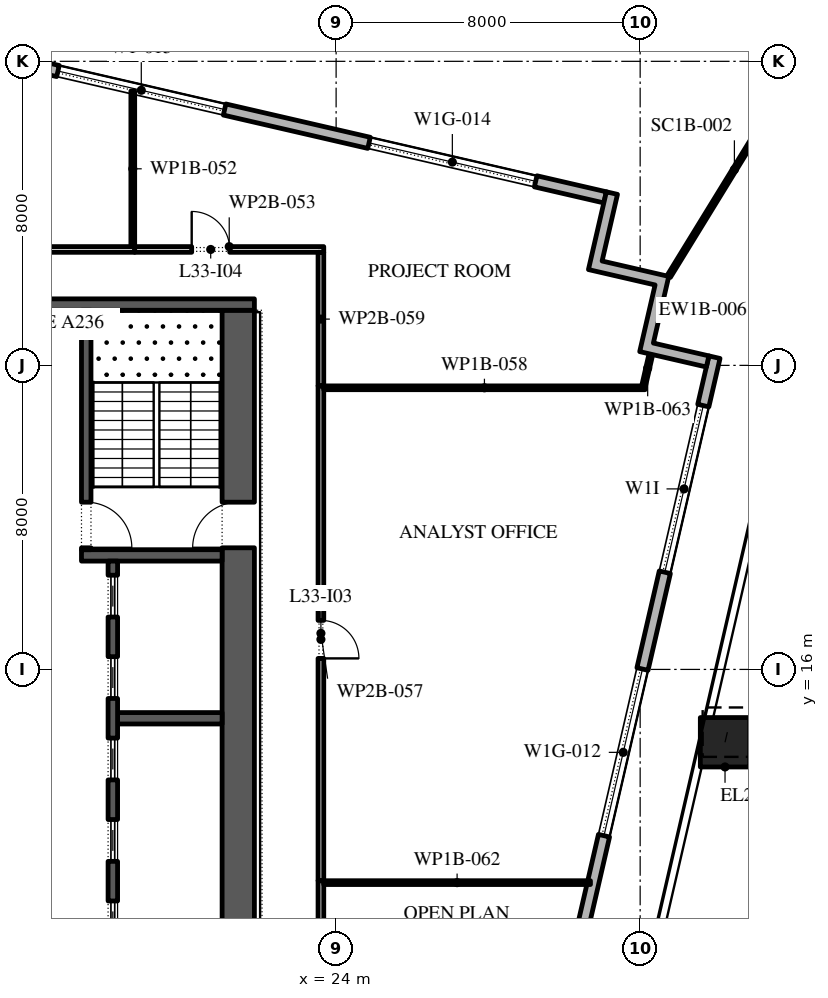
"""IFC4 building model, lengths in metres.
Left out: names, types, materials, properties, quantities, classifications, styles, units other than length and angle.
Written with IfcOpenShell. Run it as: python <this file> out.ifc"""

import sys

from ifc_helpers import new_model, si_unit, direction, frame, frame_2d, origin, origin_2d, place, context, subcontext, project, spatial, polyline, rectangle, outline, extrude, element, fill, save


model = new_model("IFC4")
c1 = context("Model", 3, precision=1e-05, world=origin(), true_north=direction((0.0, 1.0)))
c2 = subcontext(c1, "Body", "Model", "MODEL_VIEW")
j1 = project(units=[si_unit("LENGTHUNIT", "METRE"), si_unit("PLANEANGLEUNIT", "RADIAN")], contexts=[c1])
p1 = place(None, origin())
s1 = spatial("IfcSite", under=j1, at=p1, CompositionType="ELEMENT")
p2 = place(p1, origin())
s2 = spatial("IfcBuilding", under=s1, at=p2, CompositionType="ELEMENT")
p3 = place(p2, frame((0.0, 0.0, 151.8)))
s3 = spatial("IfcBuildingStorey", under=s2, at=p3, CompositionType="ELEMENT", Elevation=151.8)
p4 = place(p3, frame((34.233, 14.083, 0.0), z_axis=(0.014617836866, 0.063111930596, 0.997899395261), x_axis=(-0.974209784844, 0.225644178107, 0.0)))
e1 = element("IfcColumn", 1, at=p4, inside=s3, PredefinedType="COLUMN", context=c2, shape_type="SweptSolid", body=[
    extrude(rectangle(XDim=1.3, YDim=1.3, at=origin_2d()), origin(), (0.0, 0.0, 1.0), 4.209),
])
p5 = place(p3, frame((22.82, -24.016, 0.0), z_axis=(0.0, 0.0, 1.0), x_axis=(0.224953880882, 0.974369412223, 0.0)))
e2 = element("IfcWall", 2, at=p5, inside=s3, PredefinedType="STANDARD", context=c2, shape_type="SweptSolid", body=[
    extrude(rectangle(XDim=49.5, YDim=0.3, at=frame_2d((24.75, 0.0))), origin(), (0.0, 0.0, 1.0), 3.95),
])
p6 = place(p5, frame((1.157, 0.0, 0.45)))
e3 = element("IfcOpeningElement", 3, at=p6, cuts=e2, PredefinedType="OPENING", context=c2, shape_type="SweptSolid", body=[
    extrude(rectangle(XDim=4.5, YDim=3.05, at=frame_2d((2.25, 1.525))), frame((0.0, 0.16, 0.0), z_axis=(0.0, -1.0, 0.0), x_axis=(1.0, 0.0, 0.0)), (0.0, 0.0, 1.0), 0.32),
])
p7 = place(p5, frame((8.121, 0.0, 0.45)))
e4 = element("IfcOpeningElement", 4, at=p7, cuts=e2, PredefinedType="OPENING", context=c2, shape_type="SweptSolid", body=[
    extrude(rectangle(XDim=4.5, YDim=3.05, at=frame_2d((2.25, 1.525))), frame((0.0, 0.16, 0.0), z_axis=(0.0, -1.0, 0.0), x_axis=(1.0, 0.0, 0.0)), (0.0, 0.0, 1.0), 0.32),
])
p8 = place(p5, frame((15.236, 0.0, 0.45)))
e5 = element("IfcOpeningElement", 5, at=p8, cuts=e2, PredefinedType="OPENING", context=c2, shape_type="SweptSolid", body=[
    extrude(rectangle(XDim=4.5, YDim=3.05, at=frame_2d((2.25, 1.525))), frame((0.0, 0.16, 0.0), z_axis=(0.0, -1.0, 0.0), x_axis=(1.0, 0.0, 0.0)), (0.0, 0.0, 1.0), 0.32),
])
p9 = place(p5, frame((23.4, 0.0, 0.0)))
e6 = element("IfcOpeningElement", 6, at=p9, cuts=e2, PredefinedType="OPENING", context=c2, shape_type="SweptSolid", body=[
    extrude(rectangle(XDim=2.4, YDim=3.5, at=frame_2d((1.2, 1.75))), frame((0.0, 0.16, 0.0), z_axis=(0.0, -1.0, 0.0), x_axis=(1.0, 0.0, 0.0)), (0.0, 0.0, 1.0), 0.32),
])
p10 = place(p5, frame((29.464, 0.0, 0.45)))
e7 = element("IfcOpeningElement", 7, at=p10, cuts=e2, PredefinedType="OPENING", context=c2, shape_type="SweptSolid", body=[
    extrude(rectangle(XDim=4.5, YDim=2.825, at=frame_2d((2.25, 1.413))), frame((0.0, 0.16, 0.0), z_axis=(0.0, -1.0, 0.0), x_axis=(1.0, 0.0, 0.0)), (0.0, 0.0, 1.0), 0.32),
])
p11 = place(p5, frame((36.579, 0.0, 0.45)))
e8 = element("IfcOpeningElement", 8, at=p11, cuts=e2, PredefinedType="OPENING", context=c2, shape_type="SweptSolid", body=[
    extrude(rectangle(XDim=4.5, YDim=2.775, at=frame_2d((2.25, 1.387))), frame((0.0, 0.16, 0.0), z_axis=(0.0, -1.0, 0.0), x_axis=(1.0, 0.0, 0.0)), (0.0, 0.0, 1.0), 0.32),
])
p12 = place(p5, frame((43.693, 0.0, 0.45)))
e9 = element("IfcOpeningElement", 9, at=p12, cuts=e2, PredefinedType="OPENING", context=c2, shape_type="SweptSolid", body=[
    extrude(rectangle(XDim=4.5, YDim=2.7, at=frame_2d((2.25, 1.35))), frame((0.0, 0.16, 0.0), z_axis=(0.0, -1.0, 0.0), x_axis=(1.0, 0.0, 0.0)), (0.0, 0.0, 1.0), 0.32),
])
p13 = place(p3, frame((31.078, 28.421, 0.0), z_axis=(0.0, 0.0, 1.0), x_axis=(-0.974370456532, 0.224949357493, 0.0)))
e10 = element("IfcWall", 10, at=p13, inside=s3, PredefinedType="STANDARD", context=c2, shape_type="SweptSolid", body=[
    extrude(rectangle(XDim=51.0, YDim=0.3, at=frame_2d((25.5, 0.0))), origin(), (0.0, 0.0, 1.0), 3.95),
])
p14 = place(p13, frame((1.875, 0.0, 0.45)))
e11 = element("IfcOpeningElement", 11, at=p14, cuts=e10, PredefinedType="OPENING", context=c2, shape_type="SweptSolid", body=[
    extrude(rectangle(XDim=4.5, YDim=2.775, at=frame_2d((2.25, 1.387))), frame((0.0, 0.16, 0.0), z_axis=(0.0, -1.0, 0.0), x_axis=(1.0, 0.0, 0.0)), (0.0, 0.0, 1.0), 0.32),
])
p15 = place(p13, frame((10.275, 0.0, 0.45)))
e12 = element("IfcOpeningElement", 12, at=p15, cuts=e10, PredefinedType="OPENING", context=c2, shape_type="SweptSolid", body=[
    extrude(rectangle(XDim=4.5, YDim=3.05, at=frame_2d((2.25, 1.525))), frame((0.0, 0.16, 0.0), z_axis=(0.0, -1.0, 0.0), x_axis=(1.0, 0.0, 0.0)), (0.0, 0.0, 1.0), 0.32),
])
p16 = place(p13, frame((18.825, 0.0, 0.45)))
e13 = element("IfcOpeningElement", 13, at=p16, cuts=e10, PredefinedType="OPENING", context=c2, shape_type="SweptSolid", body=[
    extrude(rectangle(XDim=4.5, YDim=2.625, at=frame_2d((2.25, 1.312))), frame((0.0, 0.16, 0.0), z_axis=(0.0, -1.0, 0.0), x_axis=(1.0, 0.0, 0.0)), (0.0, 0.0, 1.0), 0.32),
])
p17 = place(p13, frame((28.425, 0.0, 0.0)))
e14 = element("IfcOpeningElement", 14, at=p17, cuts=e10, PredefinedType="OPENING", context=c2, shape_type="SweptSolid", body=[
    extrude(rectangle(XDim=2.4, YDim=3.5, at=frame_2d((1.2, 1.75))), frame((0.0, 0.16, 0.0), z_axis=(0.0, -1.0, 0.0), x_axis=(1.0, 0.0, 0.0)), (0.0, 0.0, 1.0), 0.32),
])
p18 = place(p13, frame((35.925, 0.0, 0.45)))
e15 = element("IfcOpeningElement", 15, at=p18, cuts=e10, PredefinedType="OPENING", context=c2, shape_type="SweptSolid", body=[
    extrude(rectangle(XDim=4.5, YDim=2.475, at=frame_2d((2.25, 1.238))), frame((0.0, 0.16, 0.0), z_axis=(0.0, -1.0, 0.0), x_axis=(1.0, 0.0, 0.0)), (0.0, 0.0, 1.0), 0.32),
])
p19 = place(p13, frame((44.475, 0.0, 0.45)))
e16 = element("IfcOpeningElement", 16, at=p19, cuts=e10, PredefinedType="OPENING", context=c2, shape_type="SweptSolid", body=[
    extrude(rectangle(XDim=4.5, YDim=2.4, at=frame_2d((2.25, 1.2))), frame((0.0, 0.16, 0.0), z_axis=(0.0, -1.0, 0.0), x_axis=(1.0, 0.0, 0.0)), (0.0, 0.0, 1.0), 0.32),
])
p20 = place(p3, origin())
e17 = element("IfcWall", 17, at=p20, inside=s3, PredefinedType="STANDARD", context=c2, shape_type="SweptSolid", body=[
    extrude(outline(polyline([(32.393, 26.116), (30.639, 26.521), (31.111, 28.567), (31.404, 28.5), (30.999, 26.746), (32.753, 26.341), (32.348, 24.587), (33.809, 24.25), (33.742, 23.957), (31.988, 24.362), (32.393, 26.116)])), origin(), (0.0, 0.0, 1.0), 3.95),
])
p21 = place(p3, frame((32.753, 26.341, -0.05), z_axis=(0.0, 0.0, 1.0), x_axis=(0.523477971455, 0.85203920884, 0.0)))
e18 = element("IfcWall", 18, at=p21, inside=s3, PredefinedType="STANDARD", context=c2, shape_type="SweptSolid", body=[
    extrude(rectangle(XDim=6.598, YDim=0.1, at=frame_2d((3.299, 0.0))), origin(), (0.0, 0.0, 1.0), 4.0),
])
p22 = place(p3, frame((21.425, -2.45, 0.0), z_axis=(0.0, 0.0, 1.0), x_axis=(0.0, 1.0, 0.0)))
e19 = element("IfcWall", 19, at=p22, inside=s3, PredefinedType="SHEAR", context=c2, shape_type="SweptSolid", body=[
    extrude(rectangle(XDim=27.9, YDim=0.85, at=frame_2d((13.95, 0.0))), origin(), (0.0, 0.0, 1.0), 3.95),
])
p23 = place(p22, frame((5.05, 0.0, 0.0)))
e20 = element("IfcOpeningElement", 20, at=p23, cuts=e19, PredefinedType="OPENING", context=c2, shape_type="SweptSolid", body=[
    extrude(rectangle(XDim=1.2, YDim=2.1, at=frame_2d((0.6, 1.05))), frame((0.0, 0.435, 0.0), z_axis=(0.0, -1.0, 0.0), x_axis=(1.0, 0.0, 0.0)), (0.0, 0.0, 1.0), 0.87),
])
p24 = place(p22, frame((21.65, 0.0, 0.0)))
e21 = element("IfcOpeningElement", 21, at=p24, cuts=e19, PredefinedType="OPENING", context=c2, shape_type="SweptSolid", body=[
    extrude(rectangle(XDim=1.2, YDim=2.1, at=frame_2d((0.6, 1.05))), frame((0.0, 0.435, 0.0), z_axis=(0.0, -1.0, 0.0), x_axis=(1.0, 0.0, 0.0)), (0.0, 0.0, 1.0), 0.87),
])
p25 = place(p3, frame((10.15, 25.6, 0.0), z_axis=(0.0, 0.0, 1.0), x_axis=(1.0, 0.0, 0.0)))
e22 = element("IfcWall", 22, at=p25, inside=s3, PredefinedType="SHEAR", context=c2, shape_type="SweptSolid", body=[
    extrude(rectangle(XDim=11.7, YDim=0.3, at=frame_2d((5.85, 0.0))), origin(), (0.0, 0.0, 1.0), 3.95),
])
p26 = place(p3, frame((17.3, 19.0, 0.0), z_axis=(0.0, 0.0, 1.0), x_axis=(1.0, 0.0, 0.0)))
e23 = element("IfcWall", 23, at=p26, inside=s3, PredefinedType="SHEAR", context=c2, shape_type="SweptSolid", body=[
    extrude(rectangle(XDim=3.7, YDim=0.3, at=frame_2d((1.85, 0.0))), origin(), (0.0, 0.0, 1.0), 3.95),
])
p27 = place(p3, frame((17.425, 19.15, 0.0), z_axis=(0.0, 0.0, 1.0), x_axis=(0.0, 1.0, 0.0)))
e24 = element("IfcWall", 24, at=p27, inside=s3, PredefinedType="SHEAR", context=c2, shape_type="SweptSolid", body=[
    extrude(rectangle(XDim=6.3, YDim=0.25, at=frame_2d((3.15, 0.0))), origin(), (0.0, 0.0, 1.0), 3.95),
])
p28 = place(p27, frame((0.05, 0.0, 0.0)))
e25 = element("IfcOpeningElement", 25, at=p28, cuts=e24, PredefinedType="OPENING", context=c2, shape_type="SweptSolid", body=[
    extrude(rectangle(XDim=1.2, YDim=2.1, at=frame_2d((0.6, 1.05))), frame((0.0, 0.135, 0.0), z_axis=(0.0, -1.0, 0.0), x_axis=(1.0, 0.0, 0.0)), (0.0, 0.0, 1.0), 0.27),
])
p29 = place(p3, frame((18.25, 14.714, 0.0), z_axis=(0.0, 0.0, 1.0), x_axis=(1.0, 0.0, 0.0)))
e26 = element("IfcWall", 26, at=p29, inside=s3, PredefinedType="SHEAR", context=c2, shape_type="SweptSolid", body=[
    extrude(rectangle(XDim=2.75, YDim=0.3, at=frame_2d((1.375, 0.0))), origin(), (0.0, 0.0, 1.0), 3.95),
])
p30 = place(p3, frame((18.125, 4.15, 0.0), z_axis=(0.0, 0.0, 1.0), x_axis=(0.0, 1.0, 0.0)))
e27 = element("IfcWall", 27, at=p30, inside=s3, PredefinedType="SHEAR", context=c2, shape_type="SweptSolid", body=[
    extrude(rectangle(XDim=14.7, YDim=0.25, at=frame_2d((7.35, 0.0))), origin(), (0.0, 0.0, 1.0), 3.95),
])
p31 = place(p30, frame((0.371, 0.0, 0.0)))
e28 = element("IfcOpeningElement", 28, at=p31, cuts=e27, PredefinedType="OPENING", context=c2, shape_type="SweptSolid", body=[
    extrude(rectangle(XDim=1.1, YDim=2.1, at=frame_2d((0.55, 1.05))), frame((0.0, 0.135, 0.0), z_axis=(0.0, -1.0, 0.0), x_axis=(1.0, 0.0, 0.0)), (0.0, 0.0, 1.0), 0.27),
])
p32 = place(p30, frame((2.514, 0.0, 0.0)))
e29 = element("IfcOpeningElement", 29, at=p32, cuts=e27, PredefinedType="OPENING", context=c2, shape_type="SweptSolid", body=[
    extrude(rectangle(XDim=1.1, YDim=2.1, at=frame_2d((0.55, 1.05))), frame((0.0, 0.135, 0.0), z_axis=(0.0, -1.0, 0.0), x_axis=(1.0, 0.0, 0.0)), (0.0, 0.0, 1.0), 0.27),
])
p33 = place(p30, frame((4.657, 0.0, 0.0)))
e30 = element("IfcOpeningElement", 30, at=p33, cuts=e27, PredefinedType="OPENING", context=c2, shape_type="SweptSolid", body=[
    extrude(rectangle(XDim=1.1, YDim=2.1, at=frame_2d((0.55, 1.05))), frame((0.0, 0.135, 0.0), z_axis=(0.0, -1.0, 0.0), x_axis=(1.0, 0.0, 0.0)), (0.0, 0.0, 1.0), 0.27),
])
p34 = place(p30, frame((6.8, 0.0, 0.0)))
e31 = element("IfcOpeningElement", 31, at=p34, cuts=e27, PredefinedType="OPENING", context=c2, shape_type="SweptSolid", body=[
    extrude(rectangle(XDim=1.1, YDim=2.1, at=frame_2d((0.55, 1.05))), frame((0.0, 0.135, 0.0), z_axis=(0.0, -1.0, 0.0), x_axis=(1.0, 0.0, 0.0)), (0.0, 0.0, 1.0), 0.27),
])
p35 = place(p30, frame((8.943, 0.0, 0.0)))
e32 = element("IfcOpeningElement", 32, at=p35, cuts=e27, PredefinedType="OPENING", context=c2, shape_type="SweptSolid", body=[
    extrude(rectangle(XDim=1.1, YDim=2.1, at=frame_2d((0.55, 1.05))), frame((0.0, 0.135, 0.0), z_axis=(0.0, -1.0, 0.0), x_axis=(1.0, 0.0, 0.0)), (0.0, 0.0, 1.0), 0.27),
])
p36 = place(p30, frame((11.086, 0.0, 0.0)))
e33 = element("IfcOpeningElement", 33, at=p36, cuts=e27, PredefinedType="OPENING", context=c2, shape_type="SweptSolid", body=[
    extrude(rectangle(XDim=1.1, YDim=2.1, at=frame_2d((0.55, 1.05))), frame((0.0, 0.135, 0.0), z_axis=(0.0, -1.0, 0.0), x_axis=(1.0, 0.0, 0.0)), (0.0, 0.0, 1.0), 0.27),
])
p37 = place(p30, frame((13.229, 0.0, 0.0)))
e34 = element("IfcOpeningElement", 34, at=p37, cuts=e27, PredefinedType="OPENING", context=c2, shape_type="SweptSolid", body=[
    extrude(rectangle(XDim=1.1, YDim=2.1, at=frame_2d((0.55, 1.05))), frame((0.0, 0.135, 0.0), z_axis=(0.0, -1.0, 0.0), x_axis=(1.0, 0.0, 0.0)), (0.0, 0.0, 1.0), 0.27),
])
p38 = place(p3, frame((8.4, 27.05, 0.0), z_axis=(0.0, 0.0, 1.0), x_axis=(1.0, 0.0, 0.0)))
e35 = element("IfcWall", 35, at=p38, inside=s3, PredefinedType="PARTITIONING", context=c2, shape_type="SweptSolid", body=[
    extrude(rectangle(XDim=10.3, YDim=0.15, at=frame_2d((5.15, 0.0))), origin(), (0.0, 0.0, 1.0), 3.95),
])
p39 = place(p38, frame((6.6, 0.0, 0.0)))
e36 = element("IfcOpeningElement", 36, at=p39, cuts=e35, PredefinedType="OPENING", context=c2, shape_type="SweptSolid", body=[
    extrude(rectangle(XDim=1.0, YDim=2.1, at=frame_2d((0.5, 1.05))), frame((0.0, 0.085, 0.0), z_axis=(0.0, -1.0, 0.0), x_axis=(1.0, 0.0, 0.0)), (0.0, 0.0, 1.0), 0.17),
])
p40 = place(p3, frame((18.65, 27.125, 0.0), z_axis=(0.0, 0.0, 1.0), x_axis=(0.0, 1.0, 0.0)))
e37 = element("IfcWall", 37, at=p40, inside=s3, PredefinedType="PARTITIONING", context=c2, shape_type="SweptSolid", body=[
    extrude(rectangle(XDim=4.094, YDim=0.1, at=frame_2d((2.047, 0.0))), origin(), (0.0, 0.0, 1.0), 3.95),
])
p41 = place(p3, frame((18.7, 27.05, 0.0), z_axis=(0.0, 0.0, 1.0), x_axis=(1.0, 0.0, 0.0)))
e38 = element("IfcWall", 38, at=p41, inside=s3, PredefinedType="PARTITIONING", context=c2, shape_type="SweptSolid", body=[
    extrude(rectangle(XDim=4.975, YDim=0.15, at=frame_2d((2.488, 0.0))), origin(), (0.0, 0.0, 1.0), 3.95),
])
p42 = place(p41, frame((1.5, 0.0, 0.0)))
e39 = element("IfcOpeningElement", 39, at=p42, cuts=e38, PredefinedType="OPENING", context=c2, shape_type="SweptSolid", body=[
    extrude(rectangle(XDim=1.0, YDim=2.1, at=frame_2d((0.5, 1.05))), frame((0.0, 0.085, 0.0), z_axis=(0.0, -1.0, 0.0), x_axis=(1.0, 0.0, 0.0)), (0.0, 0.0, 1.0), 0.17),
])
p43 = place(p3, frame((23.6, 10.44, 0.0), z_axis=(0.0, 0.0, 1.0), x_axis=(0.0, -1.0, 0.0)))
e40 = element("IfcWall", 40, at=p43, inside=s3, PredefinedType="PARTITIONING", context=c2, shape_type="SweptSolid", body=[
    extrude(rectangle(XDim=14.81, YDim=0.15, at=frame_2d((7.405, 0.0))), origin(), (0.0, 0.0, 1.0), 3.95),
])
p44 = place(p43, frame((6.86, 0.0, 0.0)))
e41 = element("IfcOpeningElement", 41, at=p44, cuts=e40, PredefinedType="OPENING", context=c2, shape_type="SweptSolid", body=[
    extrude(rectangle(XDim=1.0, YDim=2.1, at=frame_2d((0.5, 1.05))), frame((0.0, 0.085, 0.0), z_axis=(0.0, -1.0, 0.0), x_axis=(1.0, 0.0, 0.0)), (0.0, 0.0, 1.0), 0.17),
])
p45 = place(p3, frame((23.6, 23.46, 0.0), z_axis=(0.0, 0.0, 1.0), x_axis=(0.0, -1.0, 0.0)))
e42 = element("IfcWall", 42, at=p45, inside=s3, PredefinedType="PARTITIONING", context=c2, shape_type="SweptSolid", body=[
    extrude(rectangle(XDim=13.02, YDim=0.15, at=frame_2d((6.51, 0.0))), origin(), (0.0, 0.0, 1.0), 3.95),
])
p46 = place(p45, frame((6.17, 0.0, 0.0)))
e43 = element("IfcOpeningElement", 43, at=p46, cuts=e42, PredefinedType="OPENING", context=c2, shape_type="SweptSolid", body=[
    extrude(rectangle(XDim=1.0, YDim=2.1, at=frame_2d((0.5, 1.05))), frame((0.0, 0.085, 0.0), z_axis=(0.0, -1.0, 0.0), x_axis=(1.0, 0.0, 0.0)), (0.0, 0.0, 1.0), 0.17),
])
p47 = place(p3, frame((23.675, 23.41, 0.0), z_axis=(0.0, 0.0, 1.0), x_axis=(1.0, 0.0, 0.0)))
e44 = element("IfcWall", 44, at=p47, inside=s3, PredefinedType="PARTITIONING", context=c2, shape_type="SweptSolid", body=[
    extrude(rectangle(XDim=8.455, YDim=0.1, at=frame_2d((4.228, 0.0))), origin(), (0.0, 0.0, 1.0), 3.95),
])
p48 = place(p3, frame((23.6, 26.975, 0.0), z_axis=(0.0, 0.0, 1.0), x_axis=(0.0, -1.0, 0.0)))
e45 = element("IfcWall", 45, at=p48, inside=s3, PredefinedType="PARTITIONING", context=c2, shape_type="SweptSolid", body=[
    extrude(rectangle(XDim=3.515, YDim=0.15, at=frame_2d((1.758, 0.0))), origin(), (0.0, 0.0, 1.0), 3.95),
])
p49 = place(p3, frame((30.692, 10.39, 0.0), z_axis=(0.0, 0.0, 1.0), x_axis=(-1.0, 0.0, 0.0)))
e46 = element("IfcWall", 46, at=p49, inside=s3, PredefinedType="PARTITIONING", context=c2, shape_type="SweptSolid", body=[
    extrude(rectangle(XDim=7.017, YDim=0.1, at=frame_2d((3.508, 0.0))), origin(), (0.0, 0.0, 1.0), 3.95),
])
p50 = place(p3, frame((32.091, 23.459, 0.0), z_axis=(0.0, 0.0, 1.0), x_axis=(0.223406444343, 0.97472537703, 0.0)))
e47 = element("IfcWall", 47, at=p50, inside=s3, PredefinedType="PARTITIONING", context=c2, shape_type="SweptSolid", body=[
    extrude(rectangle(XDim=0.957, YDim=0.1, at=frame_2d((0.479, 0.0))), origin(), (0.0, 0.0, 1.0), 3.95),
])
p51 = place(p11, origin())
e48 = element("IfcWindow", 48, at=p51, inside=s3, PartitioningType="DOUBLE_PANEL_VERTICAL", PredefinedType="WINDOW", context=c2, shape_type="SweptSolid", body=[
    extrude(rectangle(XDim=4.5, YDim=2.775, at=frame_2d((2.25, 1.387))), frame((0.0, 0.03, 0.0), z_axis=(0.0, -1.0, 0.0), x_axis=(1.0, 0.0, 0.0)), (0.0, 0.0, 1.0), 0.06),
])
fill(e8, e48)
p52 = place(p12, origin())
e49 = element("IfcWindow", 49, at=p52, inside=s3, PartitioningType="DOUBLE_PANEL_VERTICAL", PredefinedType="WINDOW", context=c2, shape_type="SweptSolid", body=[
    extrude(rectangle(XDim=4.5, YDim=2.7, at=frame_2d((2.25, 1.35))), frame((0.0, 0.03, 0.0), z_axis=(0.0, -1.0, 0.0), x_axis=(1.0, 0.0, 0.0)), (0.0, 0.0, 1.0), 0.06),
])
fill(e9, e49)
p53 = place(p14, origin())
e50 = element("IfcWindow", 50, at=p53, inside=s3, PartitioningType="DOUBLE_PANEL_VERTICAL", PredefinedType="WINDOW", context=c2, shape_type="SweptSolid", body=[
    extrude(rectangle(XDim=4.5, YDim=2.775, at=frame_2d((2.25, 1.387))), frame((0.0, 0.03, 0.0), z_axis=(0.0, -1.0, 0.0), x_axis=(1.0, 0.0, 0.0)), (0.0, 0.0, 1.0), 0.06),
])
fill(e11, e50)
p54 = place(p15, origin())
e51 = element("IfcWindow", 51, at=p54, inside=s3, PartitioningType="DOUBLE_PANEL_VERTICAL", PredefinedType="WINDOW", context=c2, shape_type="SweptSolid", body=[
    extrude(rectangle(XDim=4.5, YDim=3.05, at=frame_2d((2.25, 1.525))), frame((0.0, 0.03, 0.0), z_axis=(0.0, -1.0, 0.0), x_axis=(1.0, 0.0, 0.0)), (0.0, 0.0, 1.0), 0.06),
])
fill(e12, e51)
p55 = place(p33, origin())
e52 = element("IfcDoor", 52, at=p55, inside=s3, OperationType="SLIDING_TO_LEFT", PredefinedType="DOOR", context=c2, shape_type="SweptSolid", body=[
    extrude(rectangle(XDim=1.1, YDim=2.1, at=frame_2d((0.55, 1.05))), frame((0.0, 0.025, 0.0), z_axis=(0.0, -1.0, 0.0), x_axis=(1.0, 0.0, 0.0)), (0.0, 0.0, 1.0), 0.05),
])
fill(e30, e52)
p56 = place(p34, origin())
e53 = element("IfcDoor", 53, at=p56, inside=s3, OperationType="SLIDING_TO_LEFT", PredefinedType="DOOR", context=c2, shape_type="SweptSolid", body=[
    extrude(rectangle(XDim=1.1, YDim=2.1, at=frame_2d((0.55, 1.05))), frame((0.0, 0.025, 0.0), z_axis=(0.0, -1.0, 0.0), x_axis=(1.0, 0.0, 0.0)), (0.0, 0.0, 1.0), 0.05),
])
fill(e31, e53)
p57 = place(p35, origin())
e54 = element("IfcDoor", 54, at=p57, inside=s3, OperationType="SLIDING_TO_LEFT", PredefinedType="DOOR", context=c2, shape_type="SweptSolid", body=[
    extrude(rectangle(XDim=1.1, YDim=2.1, at=frame_2d((0.55, 1.05))), frame((0.0, 0.025, 0.0), z_axis=(0.0, -1.0, 0.0), x_axis=(1.0, 0.0, 0.0)), (0.0, 0.0, 1.0), 0.05),
])
fill(e32, e54)
p58 = place(p36, origin())
e55 = element("IfcDoor", 55, at=p58, inside=s3, OperationType="SLIDING_TO_LEFT", PredefinedType="DOOR", context=c2, shape_type="SweptSolid", body=[
    extrude(rectangle(XDim=1.1, YDim=2.1, at=frame_2d((0.55, 1.05))), frame((0.0, 0.025, 0.0), z_axis=(0.0, -1.0, 0.0), x_axis=(1.0, 0.0, 0.0)), (0.0, 0.0, 1.0), 0.05),
])
fill(e33, e55)
p59 = place(p37, origin())
e56 = element("IfcDoor", 56, at=p59, inside=s3, OperationType="SLIDING_TO_LEFT", PredefinedType="DOOR", context=c2, shape_type="SweptSolid", body=[
    extrude(rectangle(XDim=1.1, YDim=2.1, at=frame_2d((0.55, 1.05))), frame((0.0, 0.025, 0.0), z_axis=(0.0, -1.0, 0.0), x_axis=(1.0, 0.0, 0.0)), (0.0, 0.0, 1.0), 0.05),
])
fill(e34, e56)
p60 = place(p28, frame((1.2, 0.0, 0.0), z_axis=(0.0, 0.0, 1.0), x_axis=(-1.0, 0.0, 0.0)))
e57 = element("IfcDoor", 57, at=p60, inside=s3, OperationType="SINGLE_SWING_LEFT", PredefinedType="DOOR", context=c2, shape_type="SweptSolid", body=[
    extrude(rectangle(XDim=1.2, YDim=2.1, at=frame_2d((0.6, 1.05))), frame((0.0, 0.025, 0.0), z_axis=(0.0, -1.0, 0.0), x_axis=(1.0, 0.0, 0.0)), (0.0, 0.0, 1.0), 0.05),
])
fill(e25, e57)
p61 = place(p24, origin())
e58 = element("IfcDoor", 58, at=p61, inside=s3, OperationType="SINGLE_SWING_RIGHT", PredefinedType="DOOR", context=c2, shape_type="SweptSolid", body=[
    extrude(rectangle(XDim=1.2, YDim=2.1, at=frame_2d((0.6, 1.05))), frame((0.0, 0.025, 0.0), z_axis=(0.0, -1.0, 0.0), x_axis=(1.0, 0.0, 0.0)), (0.0, 0.0, 1.0), 0.05),
])
fill(e21, e58)
p62 = place(p46, origin())
e59 = element("IfcDoor", 59, at=p62, inside=s3, OperationType="SINGLE_SWING_LEFT", PredefinedType="DOOR", context=c2, shape_type="SweptSolid", body=[
    extrude(rectangle(XDim=1.0, YDim=2.1, at=frame_2d((0.5, 1.05))), frame((0.0, 0.025, 0.0), z_axis=(0.0, -1.0, 0.0), x_axis=(1.0, 0.0, 0.0)), (0.0, 0.0, 1.0), 0.05),
])
fill(e43, e59)
p63 = place(p42, origin())
e60 = element("IfcDoor", 60, at=p63, inside=s3, OperationType="SINGLE_SWING_RIGHT", PredefinedType="DOOR", context=c2, shape_type="SweptSolid", body=[
    extrude(rectangle(XDim=1.0, YDim=2.1, at=frame_2d((0.5, 1.05))), frame((0.0, 0.025, 0.0), z_axis=(0.0, -1.0, 0.0), x_axis=(1.0, 0.0, 0.0)), (0.0, 0.0, 1.0), 0.05),
])
fill(e39, e60)
save(model, sys.argv[1])
